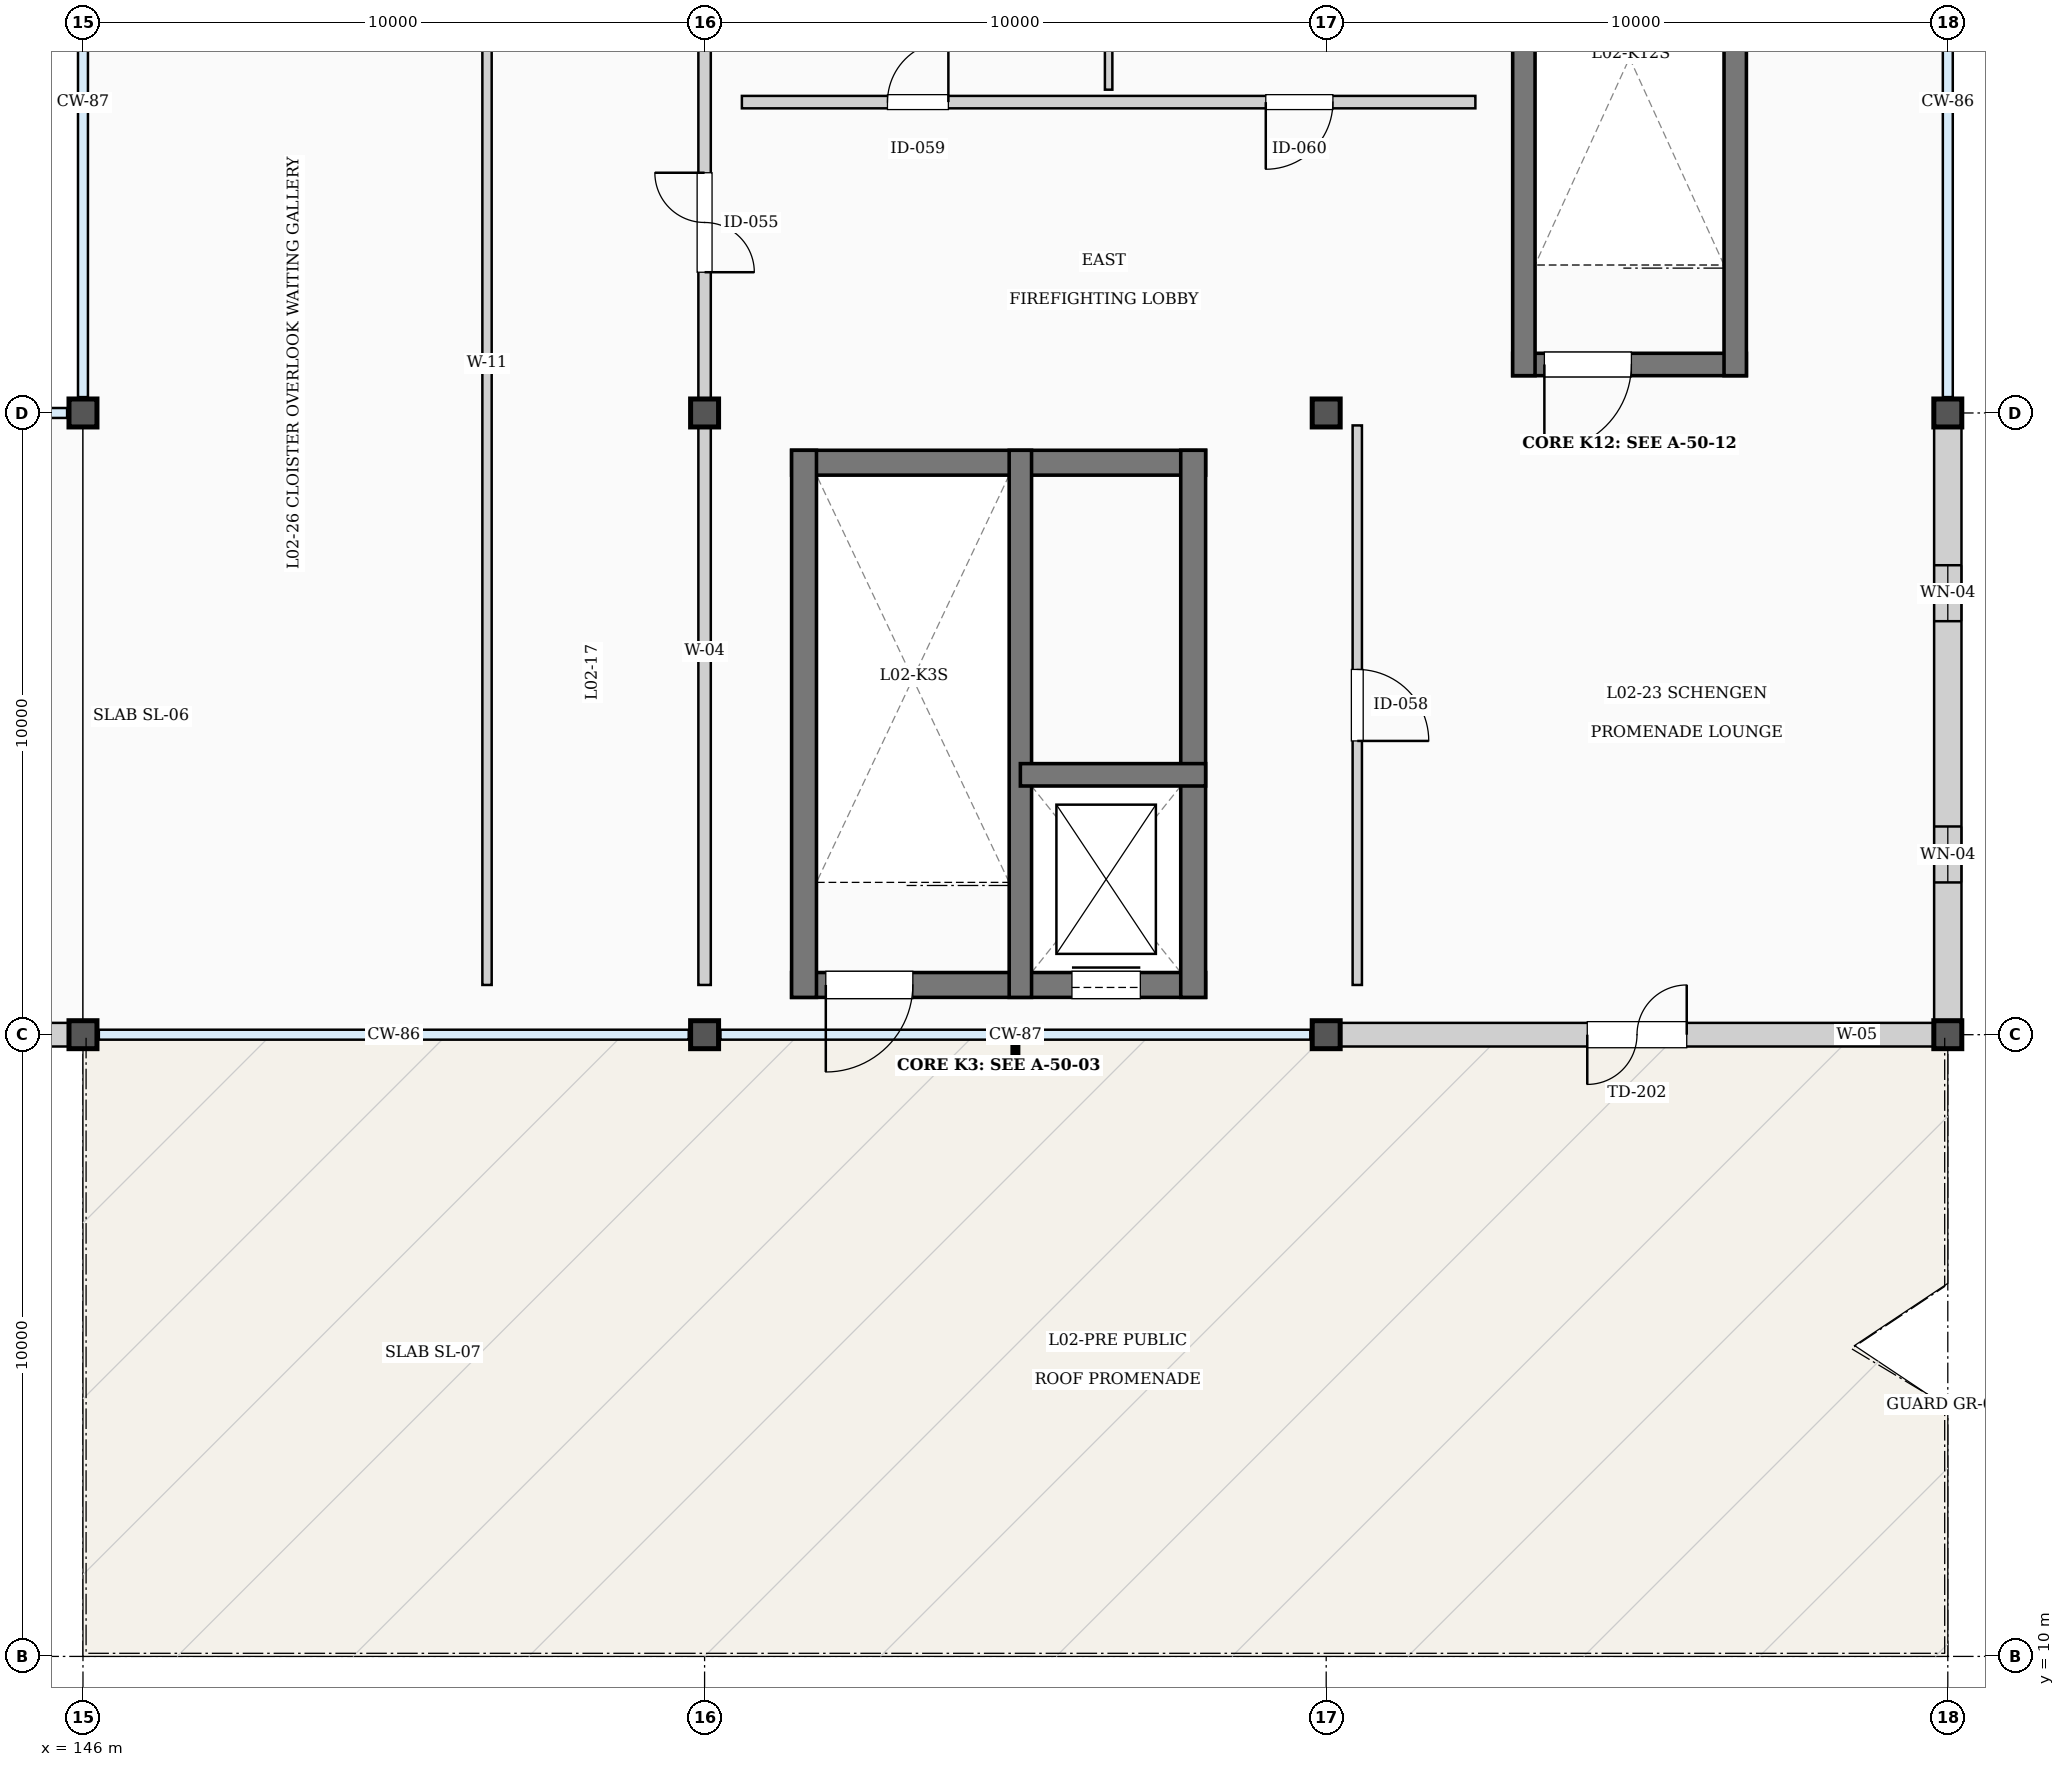
"""IFC4 building model, lengths in metres.
Left out: names, types, materials, properties, quantities, classifications, styles, units other than length and angle.
Written with IfcOpenShell. Run it as: python <this file> out.ifc"""

import sys

from ifc_helpers import new_model, si_unit, direction, frame, frame_2d, origin, origin_2d, place, context, subcontext, project, spatial, rectangle, extrude, element, fill, save


model = new_model("IFC4")
c1 = context("Model", 3, precision=1e-05, world=origin(), true_north=direction((0.0, 1.0)))
c2 = subcontext(c1, "Body", "Model", "MODEL_VIEW")
j1 = project(units=[si_unit("LENGTHUNIT", "METRE"), si_unit("PLANEANGLEUNIT", "RADIAN")], contexts=[c1])
p1 = place(None, origin())
s1 = spatial("IfcSite", under=j1, at=p1, CompositionType="ELEMENT")
p2 = place(p1, origin())
s2 = spatial("IfcBuilding", under=s1, at=p2, CompositionType="ELEMENT")
p3 = place(p2, frame((0.0, 0.0, 10.2)))
s3 = spatial("IfcBuildingStorey", under=s2, at=p3, CompositionType="ELEMENT", Elevation=10.2)
for number, where, z_axis, x_axis in (
    (1, (146.0, 20.0, 0.0), (0.0, 0.0, 1.0), (1.0, 0.0, 0.0)),
    (2, (146.0, 30.0, 0.0), (0.0, 0.0, 1.0), (1.0, 0.0, 0.0)),
    (3, (156.0, 20.0, 0.0), (0.0, 0.0, 1.0), (1.0, 0.0, 0.0)),
    (4, (156.0, 30.0, 0.0), (0.0, 0.0, 1.0), (1.0, 0.0, 0.0)),
    (5, (166.0, 20.0, 0.0), (0.0, 0.0, 1.0), (1.0, 0.0, 0.0)),
    (6, (166.0, 30.0, 0.0), (0.0, 0.0, 1.0), (1.0, 0.0, 0.0)),
    (7, (176.0, 20.0, 0.0), (0.0, 0.0, 1.0), (1.0, 0.0, 0.0)),
    (8, (176.0, 30.0, 0.0), (0.0, 0.0, 1.0), (1.0, 0.0, 0.0)),
):
    element("IfcColumn", number, at=place(p3, frame(where, z_axis=z_axis, x_axis=x_axis)), inside=s3, PredefinedType="COLUMN", context=c2, shape_type="SweptSolid", body=[
        extrude(rectangle(XDim=0.45, YDim=0.45, at=origin_2d()), origin(), (0.0, 0.0, 1.0), 4.2),
    ])
p4 = place(p3, frame((136.225, 20.0, 0.0), z_axis=(0.0, 0.0, 1.0), x_axis=(1.0, 0.0, 0.0)))
e9 = element("IfcWall", 9, at=p4, inside=s3, PredefinedType="SOLIDWALL", context=c2, shape_type="SweptSolid", body=[
    extrude(rectangle(XDim=9.55, YDim=0.38, at=frame_2d((4.775, 0.0))), origin(), (0.0, 0.0, 1.0), 3.63),
])
p5 = place(p4, frame((1.624, 0.0, 0.9)))
e10 = element("IfcOpeningElement", 10, at=p5, cuts=e9, PredefinedType="OPENING", context=c2, shape_type="SweptSolid", body=[
    extrude(rectangle(XDim=2.1, YDim=1.5, at=frame_2d((1.05, 0.75))), frame((0.0, 0.2, 0.0), z_axis=(0.0, -1.0, 0.0), x_axis=(1.0, 0.0, 0.0)), (0.0, 0.0, 1.0), 0.4),
])
p6 = place(p4, frame((5.826, 0.0, 0.9)))
e11 = element("IfcOpeningElement", 11, at=p6, cuts=e9, PredefinedType="OPENING", context=c2, shape_type="SweptSolid", body=[
    extrude(rectangle(XDim=2.1, YDim=1.5, at=frame_2d((1.05, 0.75))), frame((0.0, 0.2, 0.0), z_axis=(0.0, -1.0, 0.0), x_axis=(1.0, 0.0, 0.0)), (0.0, 0.0, 1.0), 0.4),
])
p7 = place(p3, frame((166.225, 20.0, 0.0), z_axis=(0.0, 0.0, 1.0), x_axis=(1.0, 0.0, 0.0)))
e12 = element("IfcWall", 12, at=p7, inside=s3, PredefinedType="SOLIDWALL", context=c2, shape_type="SweptSolid", body=[
    extrude(rectangle(XDim=9.55, YDim=0.38, at=frame_2d((4.775, 0.0))), origin(), (0.0, 0.0, 1.0), 3.88),
])
p8 = place(p7, frame((3.975, 0.0, 0.0)))
e13 = element("IfcOpeningElement", 13, at=p8, cuts=e12, PredefinedType="OPENING", context=c2, shape_type="SweptSolid", body=[
    extrude(rectangle(XDim=1.6, YDim=2.35, at=frame_2d((0.8, 1.175))), frame((0.0, 0.2, 0.0), z_axis=(0.0, -1.0, 0.0), x_axis=(1.0, 0.0, 0.0)), (0.0, 0.0, 1.0), 0.4),
])
p9 = place(p3, frame((176.0, 29.775, 0.0), z_axis=(0.0, 0.0, 1.0), x_axis=(0.0, -1.0, 0.0)))
e14 = element("IfcWall", 14, at=p9, inside=s3, PredefinedType="SOLIDWALL", context=c2, shape_type="SweptSolid", body=[
    extrude(rectangle(XDim=9.55, YDim=0.44, at=frame_2d((4.775, 0.0))), origin(), (0.0, 0.0, 1.0), 3.88),
])
p10 = place(p9, frame((2.224, 0.0, 0.9)))
e15 = element("IfcOpeningElement", 15, at=p10, cuts=e14, PredefinedType="OPENING", context=c2, shape_type="SweptSolid", body=[
    extrude(rectangle(XDim=0.9, YDim=2.4, at=frame_2d((0.45, 1.2))), frame((0.0, 0.23, 0.0), z_axis=(0.0, -1.0, 0.0), x_axis=(1.0, 0.0, 0.0)), (0.0, 0.0, 1.0), 0.46),
])
p11 = place(p9, frame((6.426, 0.0, 0.9)))
e16 = element("IfcOpeningElement", 16, at=p11, cuts=e14, PredefinedType="OPENING", context=c2, shape_type="SweptSolid", body=[
    extrude(rectangle(XDim=0.9, YDim=2.4, at=frame_2d((0.45, 1.2))), frame((0.0, 0.23, 0.0), z_axis=(0.0, -1.0, 0.0), x_axis=(1.0, 0.0, 0.0)), (0.0, 0.0, 1.0), 0.46),
])
p12 = place(p3, frame((157.4, 20.8, 0.0), z_axis=(0.0, 0.0, 1.0), x_axis=(1.0, 0.0, 0.0)))
e17 = element("IfcWall", 17, at=p12, inside=s3, PredefinedType="SHEAR", context=c2, shape_type="SweptSolid", body=[
    extrude(rectangle(XDim=6.66, YDim=0.4, at=frame_2d((3.33, 0.0))), origin(), (0.0, 0.0, 1.0), 3.65),
])
p13 = place(p12, frame((0.55, 0.0, 0.0)))
e18 = element("IfcOpeningElement", 18, at=p13, cuts=e17, PredefinedType="OPENING", context=c2, shape_type="SweptSolid", body=[
    extrude(rectangle(XDim=1.4, YDim=2.35, at=frame_2d((0.7, 1.175))), frame((0.0, 0.21, 0.0), z_axis=(0.0, -1.0, 0.0), x_axis=(1.0, 0.0, 0.0)), (0.0, 0.0, 1.0), 0.42),
])
p14 = place(p12, frame((4.51, 0.0, 0.0)))
e19 = element("IfcOpeningElement", 19, at=p14, cuts=e17, PredefinedType="OPENING", context=c2, shape_type="SweptSolid", body=[
    extrude(rectangle(XDim=1.1, YDim=2.3, at=frame_2d((0.55, 1.15))), frame((0.0, 0.21, 0.0), z_axis=(0.0, -1.0, 0.0), x_axis=(1.0, 0.0, 0.0)), (0.0, 0.0, 1.0), 0.42),
])
p15 = place(p3, frame((157.4, 29.2, 0.0), z_axis=(0.0, 0.0, 1.0), x_axis=(1.0, 0.0, 0.0)))
e20 = element("IfcWall", 20, at=p15, inside=s3, PredefinedType="SHEAR", context=c2, shape_type="SweptSolid", body=[
    extrude(rectangle(XDim=6.66, YDim=0.4, at=frame_2d((3.33, 0.0))), origin(), (0.0, 0.0, 1.0), 3.65),
])
for number, where, z_axis, x_axis in (
    (21, (157.6, 20.6, 0.0), (0.0, 0.0, 1.0), (0.0, 1.0, 0.0)),
    (22, (163.86, 20.6, 0.0), (0.0, 0.0, 1.0), (0.0, 1.0, 0.0)),
):
    element("IfcWall", number, at=place(p3, frame(where, z_axis=z_axis, x_axis=x_axis)), inside=s3, PredefinedType="SHEAR", context=c2, shape_type="SweptSolid", body=[
        extrude(rectangle(XDim=8.8, YDim=0.4, at=frame_2d((4.4, 0.0))), origin(), (0.0, 0.0, 1.0), 3.65),
    ])
p16 = place(p3, frame((161.08, 20.6, 0.0), z_axis=(0.0, 0.0, 1.0), x_axis=(0.0, 1.0, 0.0)))
e23 = element("IfcWall", 23, at=p16, inside=s3, PredefinedType="SHEAR", context=c2, shape_type="SweptSolid", body=[
    extrude(rectangle(XDim=8.8, YDim=0.36, at=frame_2d((4.4, 0.0))), origin(), (0.0, 0.0, 1.0), 3.65),
])
p17 = place(p3, frame((161.08, 24.18, 0.0), z_axis=(0.0, 0.0, 1.0), x_axis=(1.0, 0.0, 0.0)))
e24 = element("IfcWall", 24, at=p17, inside=s3, PredefinedType="SHEAR", context=c2, shape_type="SweptSolid", body=[
    extrude(rectangle(XDim=2.98, YDim=0.36, at=frame_2d((1.49, 0.0))), origin(), (0.0, 0.0, 1.0), 3.65),
])
p18 = place(p3, frame((169.0, 30.78, 0.0), z_axis=(0.0, 0.0, 1.0), x_axis=(1.0, 0.0, 0.0)))
e25 = element("IfcWall", 25, at=p18, inside=s3, PredefinedType="SHEAR", context=c2, shape_type="SweptSolid", body=[
    extrude(rectangle(XDim=3.76, YDim=0.36, at=frame_2d((1.88, 0.0))), origin(), (0.0, 0.0, 1.0), 3.65),
])
p19 = place(p18, frame((0.51, 0.0, 0.0)))
e26 = element("IfcOpeningElement", 26, at=p19, cuts=e25, PredefinedType="OPENING", context=c2, shape_type="SweptSolid", body=[
    extrude(rectangle(XDim=1.4, YDim=2.35, at=frame_2d((0.7, 1.175))), frame((0.0, 0.19, 0.0), z_axis=(0.0, -1.0, 0.0), x_axis=(1.0, 0.0, 0.0)), (0.0, 0.0, 1.0), 0.38),
])
for number, where, z_axis, x_axis in (
    (27, (169.18, 30.6, 0.0), (0.0, 0.0, 1.0), (0.0, 1.0, 0.0)),
    (28, (172.58, 30.6, 0.0), (0.0, 0.0, 1.0), (0.0, 1.0, 0.0)),
):
    element("IfcWall", number, at=place(p3, frame(where, z_axis=z_axis, x_axis=x_axis)), inside=s3, PredefinedType="SHEAR", context=c2, shape_type="SweptSolid", body=[
        extrude(rectangle(XDim=8.8, YDim=0.36, at=frame_2d((4.4, 0.0))), origin(), (0.0, 0.0, 1.0), 3.65),
    ])
p20 = place(p3, frame((152.5, 20.8, 0.0), z_axis=(0.0, 0.0, 1.0), x_axis=(0.0, 1.0, 0.0)))
e29 = element("IfcWall", 29, at=p20, inside=s3, PredefinedType="PARTITIONING", context=c2, shape_type="SweptSolid", body=[
    extrude(rectangle(XDim=58.4, YDim=0.15, at=frame_2d((29.2, 0.0))), origin(), (0.0, 0.0, 1.0), 3.86),
])
p21 = place(p20, frame((23.528, 0.0, 0.0)))
e30 = element("IfcOpeningElement", 30, at=p21, cuts=e29, PredefinedType="OPENING", context=c2, shape_type="SweptSolid", body=[
    extrude(rectangle(XDim=2.0, YDim=2.45, at=frame_2d((1.0, 1.225))), frame((0.0, 0.085, 0.0), z_axis=(0.0, -1.0, 0.0), x_axis=(1.0, 0.0, 0.0)), (0.0, 0.0, 1.0), 0.17),
])
p22 = place(p3, frame((156.0, 20.8, 0.0), z_axis=(0.0, 0.0, 1.0), x_axis=(0.0, 1.0, 0.0)))
e31 = element("IfcWall", 31, at=p22, inside=s3, PredefinedType="PARTITIONING", context=c2, shape_type="SweptSolid", body=[
    extrude(rectangle(XDim=58.4, YDim=0.2, at=frame_2d((29.2, 0.0))), origin(), (0.0, 0.0, 1.0), 3.86),
])
p23 = place(p22, frame((11.464, 0.0, 0.0)))
e32 = element("IfcOpeningElement", 32, at=p23, cuts=e31, PredefinedType="OPENING", context=c2, shape_type="SweptSolid", body=[
    extrude(rectangle(XDim=1.6, YDim=2.4, at=frame_2d((0.8, 1.2))), frame((0.0, 0.11, 0.0), z_axis=(0.0, -1.0, 0.0), x_axis=(1.0, 0.0, 0.0)), (0.0, 0.0, 1.0), 0.22),
])
p24 = place(p22, frame((23.428, 0.0, 0.0)))
e33 = element("IfcOpeningElement", 33, at=p24, cuts=e31, PredefinedType="OPENING", context=c2, shape_type="SweptSolid", body=[
    extrude(rectangle(XDim=2.2, YDim=2.5, at=frame_2d((1.1, 1.25))), frame((0.0, 0.11, 0.0), z_axis=(0.0, -1.0, 0.0), x_axis=(1.0, 0.0, 0.0)), (0.0, 0.0, 1.0), 0.22),
])
p25 = place(p22, frame((44.552, 0.0, 0.0)))
e34 = element("IfcOpeningElement", 34, at=p25, cuts=e31, PredefinedType="OPENING", context=c2, shape_type="SweptSolid", body=[
    extrude(rectangle(XDim=2.0, YDim=2.45, at=frame_2d((1.0, 1.225))), frame((0.0, 0.11, 0.0), z_axis=(0.0, -1.0, 0.0), x_axis=(1.0, 0.0, 0.0)), (0.0, 0.0, 1.0), 0.22),
])
p26 = place(p3, frame((166.5, 20.8, 0.0), z_axis=(0.0, 0.0, 1.0), x_axis=(0.0, 1.0, 0.0)))
e35 = element("IfcWall", 35, at=p26, inside=s3, PredefinedType="PARTITIONING", context=c2, shape_type="SweptSolid", body=[
    extrude(rectangle(XDim=9.0, YDim=0.15, at=frame_2d((4.5, 0.0))), origin(), (0.0, 0.0, 1.0), 3.86),
])
p27 = place(p26, frame((3.925, 0.0, 0.0)))
e36 = element("IfcOpeningElement", 36, at=p27, cuts=e35, PredefinedType="OPENING", context=c2, shape_type="SweptSolid", body=[
    extrude(rectangle(XDim=1.15, YDim=2.35, at=frame_2d((0.575, 1.175))), frame((0.0, 0.085, 0.0), z_axis=(0.0, -1.0, 0.0), x_axis=(1.0, 0.0, 0.0)), (0.0, 0.0, 1.0), 0.17),
])
p28 = place(p3, frame((156.6, 35.0, 0.0), z_axis=(0.0, 0.0, 1.0), x_axis=(1.0, 0.0, 0.0)))
e37 = element("IfcWall", 37, at=p28, inside=s3, PredefinedType="PARTITIONING", context=c2, shape_type="SweptSolid", body=[
    extrude(rectangle(XDim=11.8, YDim=0.2, at=frame_2d((5.9, 0.0))), origin(), (0.0, 0.0, 1.0), 3.86),
])
p29 = place(p28, frame((2.342, 0.0, 0.0)))
e38 = element("IfcOpeningElement", 38, at=p29, cuts=e37, PredefinedType="OPENING", context=c2, shape_type="SweptSolid", body=[
    extrude(rectangle(XDim=0.98, YDim=2.3, at=frame_2d((0.49, 1.15))), frame((0.0, 0.11, 0.0), z_axis=(0.0, -1.0, 0.0), x_axis=(1.0, 0.0, 0.0)), (0.0, 0.0, 1.0), 0.22),
])
p30 = place(p28, frame((8.428, 0.0, 0.0)))
e39 = element("IfcOpeningElement", 39, at=p30, cuts=e37, PredefinedType="OPENING", context=c2, shape_type="SweptSolid", body=[
    extrude(rectangle(XDim=1.08, YDim=2.35, at=frame_2d((0.54, 1.175))), frame((0.0, 0.11, 0.0), z_axis=(0.0, -1.0, 0.0), x_axis=(1.0, 0.0, 0.0)), (0.0, 0.0, 1.0), 0.22),
])
p31 = place(p3, frame((162.5, 35.2, 0.0), z_axis=(0.0, 0.0, 1.0), x_axis=(0.0, 1.0, 0.0)))
e40 = element("IfcWall", 40, at=p31, inside=s3, PredefinedType="PARTITIONING", context=c2, shape_type="SweptSolid", body=[
    extrude(rectangle(XDim=4.6, YDim=0.12, at=frame_2d((2.3, 0.0))), origin(), (0.0, 0.0, 1.0), 3.86),
])
p32 = place(p8, origin())
e41 = element("IfcDoor", 41, at=p32, inside=s3, OperationType="DOUBLE_DOOR_SINGLE_SWING", PredefinedType="DOOR", context=c2, shape_type="SweptSolid", body=[
    extrude(rectangle(XDim=1.6, YDim=2.35, at=frame_2d((0.8, 1.175))), frame((0.0, 0.025, 0.0), z_axis=(0.0, -1.0, 0.0), x_axis=(1.0, 0.0, 0.0)), (0.0, 0.0, 1.0), 0.05),
])
fill(e13, e41)
p33 = place(p10, origin())
e42 = element("IfcWindow", 42, at=p33, inside=s3, PartitioningType="SINGLE_PANEL", PredefinedType="WINDOW", context=c2, shape_type="SweptSolid", body=[
    extrude(rectangle(XDim=0.9, YDim=2.4, at=frame_2d((0.45, 1.2))), frame((0.0, 0.03, 0.0), z_axis=(0.0, -1.0, 0.0), x_axis=(1.0, 0.0, 0.0)), (0.0, 0.0, 1.0), 0.06),
])
fill(e15, e42)
p34 = place(p11, origin())
e43 = element("IfcWindow", 43, at=p34, inside=s3, PartitioningType="SINGLE_PANEL", PredefinedType="WINDOW", context=c2, shape_type="SweptSolid", body=[
    extrude(rectangle(XDim=0.9, YDim=2.4, at=frame_2d((0.45, 1.2))), frame((0.0, 0.03, 0.0), z_axis=(0.0, -1.0, 0.0), x_axis=(1.0, 0.0, 0.0)), (0.0, 0.0, 1.0), 0.06),
])
fill(e16, e43)
p35 = place(p13, origin())
e44 = element("IfcDoor", 44, at=p35, inside=s3, OperationType="SINGLE_SWING_LEFT", PredefinedType="DOOR", context=c2, shape_type="SweptSolid", body=[
    extrude(rectangle(XDim=1.4, YDim=2.35, at=frame_2d((0.7, 1.175))), frame((0.0, 0.025, 0.0), z_axis=(0.0, -1.0, 0.0), x_axis=(1.0, 0.0, 0.0)), (0.0, 0.0, 1.0), 0.05),
])
fill(e18, e44)
p36 = place(p14, origin())
e45 = element("IfcDoor", 45, at=p36, inside=s3, OperationType="SLIDING_TO_LEFT", PredefinedType="DOOR", context=c2, shape_type="SweptSolid", body=[
    extrude(rectangle(XDim=1.1, YDim=2.3, at=frame_2d((0.55, 1.15))), frame((0.0, 0.025, 0.0), z_axis=(0.0, -1.0, 0.0), x_axis=(1.0, 0.0, 0.0)), (0.0, 0.0, 1.0), 0.05),
])
fill(e19, e45)
p37 = place(p19, origin())
e46 = element("IfcDoor", 46, at=p37, inside=s3, OperationType="SINGLE_SWING_LEFT", PredefinedType="DOOR", context=c2, shape_type="SweptSolid", body=[
    extrude(rectangle(XDim=1.4, YDim=2.35, at=frame_2d((0.7, 1.175))), frame((0.0, 0.025, 0.0), z_axis=(0.0, -1.0, 0.0), x_axis=(1.0, 0.0, 0.0)), (0.0, 0.0, 1.0), 0.05),
])
fill(e26, e46)
p38 = place(p23, origin())
e47 = element("IfcDoor", 47, at=p38, inside=s3, OperationType="DOUBLE_DOOR_SINGLE_SWING", PredefinedType="DOOR", context=c2, shape_type="SweptSolid", body=[
    extrude(rectangle(XDim=1.6, YDim=2.4, at=frame_2d((0.8, 1.2))), frame((0.0, 0.025, 0.0), z_axis=(0.0, -1.0, 0.0), x_axis=(1.0, 0.0, 0.0)), (0.0, 0.0, 1.0), 0.05),
])
fill(e32, e47)
p39 = place(p27, origin())
e48 = element("IfcDoor", 48, at=p39, inside=s3, OperationType="SINGLE_SWING_LEFT", PredefinedType="DOOR", context=c2, shape_type="SweptSolid", body=[
    extrude(rectangle(XDim=1.15, YDim=2.35, at=frame_2d((0.575, 1.175))), frame((0.0, 0.025, 0.0), z_axis=(0.0, -1.0, 0.0), x_axis=(1.0, 0.0, 0.0)), (0.0, 0.0, 1.0), 0.05),
])
fill(e36, e48)
p40 = place(p29, origin())
e49 = element("IfcDoor", 49, at=p40, inside=s3, OperationType="SINGLE_SWING_RIGHT", PredefinedType="DOOR", context=c2, shape_type="SweptSolid", body=[
    extrude(rectangle(XDim=0.98, YDim=2.3, at=frame_2d((0.49, 1.15))), frame((0.0, 0.025, 0.0), z_axis=(0.0, -1.0, 0.0), x_axis=(1.0, 0.0, 0.0)), (0.0, 0.0, 1.0), 0.05),
])
fill(e38, e49)
p41 = place(p30, origin())
e50 = element("IfcDoor", 50, at=p41, inside=s3, OperationType="SINGLE_SWING_LEFT", PredefinedType="DOOR", context=c2, shape_type="SweptSolid", body=[
    extrude(rectangle(XDim=1.08, YDim=2.35, at=frame_2d((0.54, 1.175))), frame((0.0, 0.025, 0.0), z_axis=(0.0, -1.0, 0.0), x_axis=(1.0, 0.0, 0.0)), (0.0, 0.0, 1.0), 0.05),
])
fill(e39, e50)
save(model, sys.argv[1])
